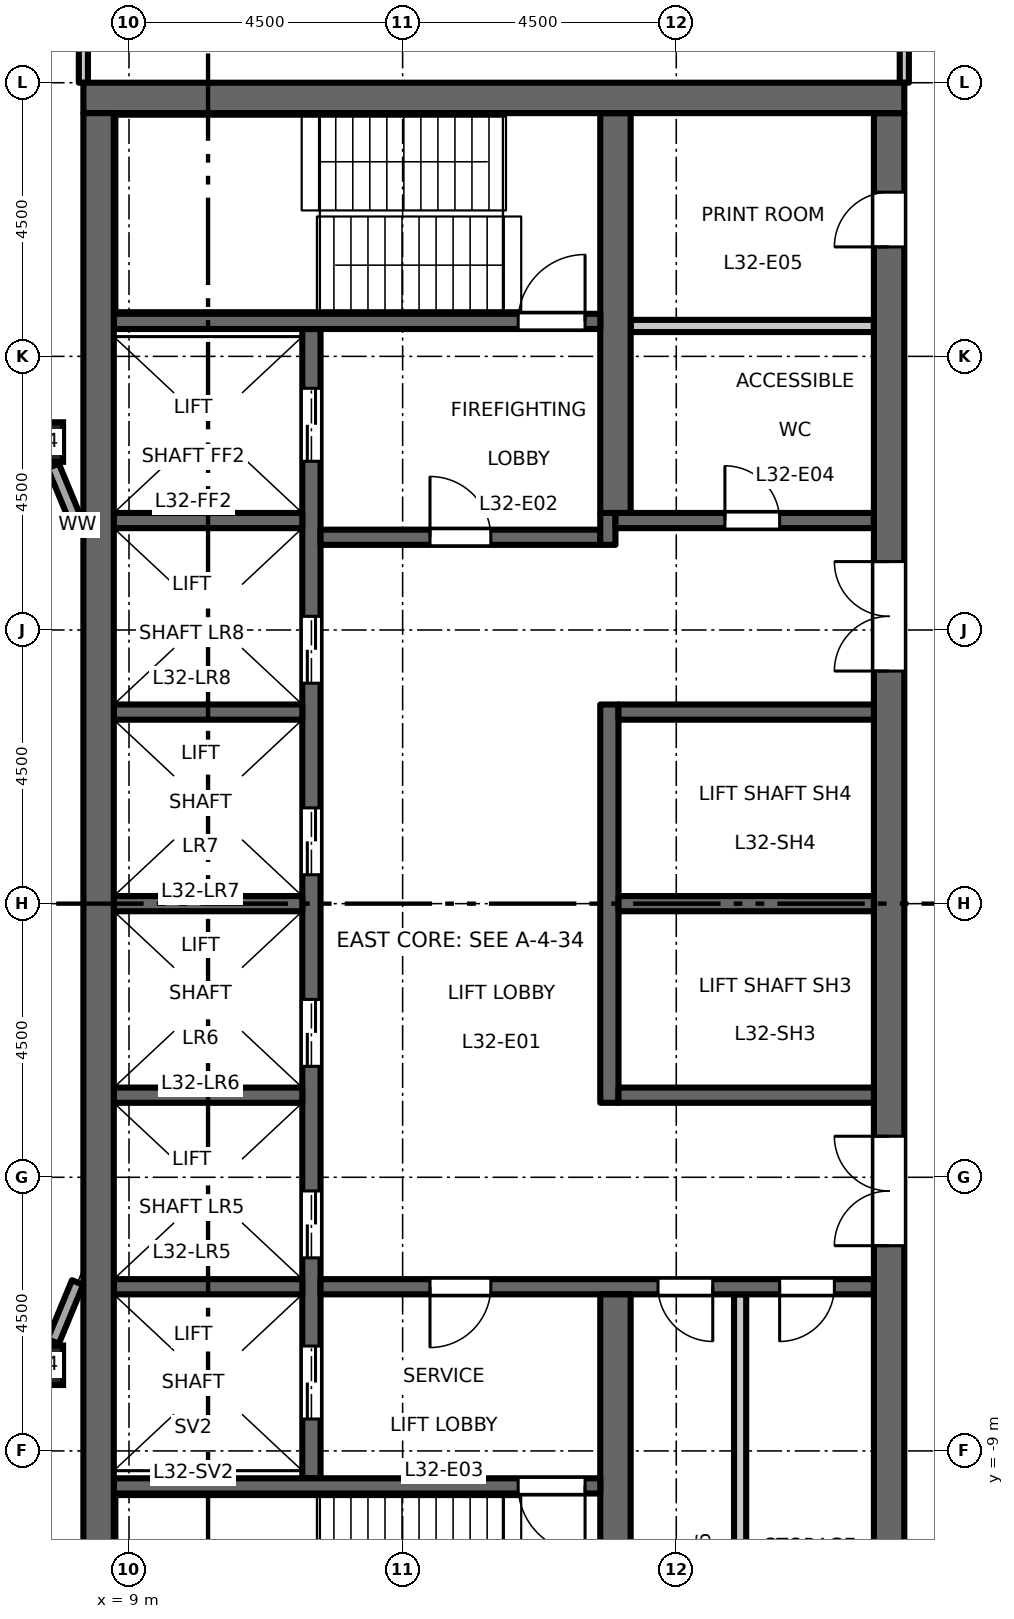
"""IFC4 building model, lengths in metres.
Left out: names, types, materials, properties, quantities, classifications, styles, units other than length and angle.
Written with IfcOpenShell. Run it as: python <this file> out.ifc"""

import sys

from ifc_helpers import new_model, si_unit, direction, frame, frame_2d, origin, origin_2d, place, context, subcontext, project, spatial, rectangle, hollow_rectangle, extrude, element, fill, save


model = new_model("IFC4")
c1 = context("Model", 3, precision=1e-05, world=origin(), true_north=direction((0.0, 1.0)))
c2 = subcontext(c1, "Body", "Model", "MODEL_VIEW")
j1 = project(units=[si_unit("LENGTHUNIT", "METRE"), si_unit("PLANEANGLEUNIT", "RADIAN")], contexts=[c1])
p1 = place(None, origin())
s1 = spatial("IfcSite", under=j1, at=p1, CompositionType="ELEMENT")
p2 = place(p1, origin())
s2 = spatial("IfcBuilding", under=s1, at=p2, CompositionType="ELEMENT")
p3 = place(p2, frame((0.0, 0.0, 149.7)))
s3 = spatial("IfcBuildingStorey", under=s2, at=p3, CompositionType="ELEMENT", Elevation=149.7)
for number, where, z_axis, x_axis in (
    (1, (7.591, -7.591, 0.0), (0.0, 0.0, 1.0), (1.0, 0.0, 0.0)),
    (2, (7.591, 7.591, 0.0), (0.0, 0.0, 1.0), (1.0, 0.0, 0.0)),
):
    element("IfcColumn", number, at=place(p3, frame(where, z_axis=z_axis, x_axis=x_axis)), inside=s3, PredefinedType="COLUMN", context=c2, shape_type="SweptSolid", body=[
        extrude(hollow_rectangle(XDim=0.65, YDim=0.65, WallThickness=0.036, at=origin_2d()), origin(), (0.0, 0.0, 1.0), 4.5),
    ])
p4 = place(p3, frame((12.0, -9.45, 0.0), z_axis=(0.0, 0.0, 1.0), x_axis=(0.0, 1.0, 0.0)))
e3 = element("IfcWall", 3, at=p4, inside=s3, PredefinedType="SHEAR", context=c2, shape_type="SweptSolid", body=[
    extrude(rectangle(XDim=18.9, YDim=0.3, at=frame_2d((9.45, 0.0))), origin(), (0.0, 0.0, 1.0), 4.35),
])
p5 = place(p4, frame((3.625, 0.0, 0.0)))
e4 = element("IfcOpeningElement", 4, at=p5, cuts=e3, PredefinedType="OPENING", context=c2, shape_type="SweptSolid", body=[
    extrude(rectangle(XDim=1.1, YDim=2.1, at=frame_2d((0.55, 1.05))), frame((0.0, 0.16, 0.0), z_axis=(0.0, -1.0, 0.0), x_axis=(1.0, 0.0, 0.0)), (0.0, 0.0, 1.0), 0.32),
])
p6 = place(p4, frame((6.775, 0.0, 0.0)))
e5 = element("IfcOpeningElement", 5, at=p6, cuts=e3, PredefinedType="OPENING", context=c2, shape_type="SweptSolid", body=[
    extrude(rectangle(XDim=1.1, YDim=2.1, at=frame_2d((0.55, 1.05))), frame((0.0, 0.16, 0.0), z_axis=(0.0, -1.0, 0.0), x_axis=(1.0, 0.0, 0.0)), (0.0, 0.0, 1.0), 0.32),
])
p7 = place(p4, frame((9.925, 0.0, 0.0)))
e6 = element("IfcOpeningElement", 6, at=p7, cuts=e3, PredefinedType="OPENING", context=c2, shape_type="SweptSolid", body=[
    extrude(rectangle(XDim=1.1, YDim=2.1, at=frame_2d((0.55, 1.05))), frame((0.0, 0.16, 0.0), z_axis=(0.0, -1.0, 0.0), x_axis=(1.0, 0.0, 0.0)), (0.0, 0.0, 1.0), 0.32),
])
p8 = place(p4, frame((13.075, 0.0, 0.0)))
e7 = element("IfcOpeningElement", 7, at=p8, cuts=e3, PredefinedType="OPENING", context=c2, shape_type="SweptSolid", body=[
    extrude(rectangle(XDim=1.1, YDim=2.1, at=frame_2d((0.55, 1.05))), frame((0.0, 0.16, 0.0), z_axis=(0.0, -1.0, 0.0), x_axis=(1.0, 0.0, 0.0)), (0.0, 0.0, 1.0), 0.32),
])
p9 = place(p4, frame((16.725, 0.0, 0.0)))
e8 = element("IfcOpeningElement", 8, at=p9, cuts=e3, PredefinedType="OPENING", context=c2, shape_type="SweptSolid", body=[
    extrude(rectangle(XDim=1.2, YDim=2.1, at=frame_2d((0.6, 1.05))), frame((0.0, 0.16, 0.0), z_axis=(0.0, -1.0, 0.0), x_axis=(1.0, 0.0, 0.0)), (0.0, 0.0, 1.0), 0.32),
])
p10 = place(p4, frame((0.975, 0.0, 0.0)))
e9 = element("IfcOpeningElement", 9, at=p10, cuts=e3, PredefinedType="OPENING", context=c2, shape_type="SweptSolid", body=[
    extrude(rectangle(XDim=1.2, YDim=2.1, at=frame_2d((0.6, 1.05))), frame((0.0, 0.16, 0.0), z_axis=(0.0, -1.0, 0.0), x_axis=(1.0, 0.0, 0.0)), (0.0, 0.0, 1.0), 0.32),
])
p11 = place(p3, frame((12.15, 6.025, 0.0), z_axis=(0.0, 0.0, 1.0), x_axis=(1.0, 0.0, 0.0)))
e10 = element("IfcWall", 10, at=p11, inside=s3, PredefinedType="SHEAR", context=c2, shape_type="SweptSolid", body=[
    extrude(rectangle(XDim=4.6, YDim=0.25, at=frame_2d((2.3, 0.0))), origin(), (0.0, 0.0, 1.0), 4.35),
])
p12 = place(p11, frame((1.8, 0.0, 0.0)))
e11 = element("IfcOpeningElement", 11, at=p12, cuts=e10, PredefinedType="OPENING", context=c2, shape_type="SweptSolid", body=[
    extrude(rectangle(XDim=1.0, YDim=2.1, at=frame_2d((0.5, 1.05))), frame((0.0, 0.135, 0.0), z_axis=(0.0, -1.0, 0.0), x_axis=(1.0, 0.0, 0.0)), (0.0, 0.0, 1.0), 0.27),
])
p13 = place(p3, frame((16.875, 5.9, 0.0), z_axis=(0.0, 0.0, 1.0), x_axis=(0.0, 1.0, 0.0)))
e12 = element("IfcWall", 12, at=p13, inside=s3, PredefinedType="SHEAR", context=c2, shape_type="SweptSolid", body=[
    extrude(rectangle(XDim=0.525, YDim=0.25, at=frame_2d((0.263, 0.0))), origin(), (0.0, 0.0, 1.0), 4.35),
])
p14 = place(p3, frame((17.0, 6.3, 0.0), z_axis=(0.0, 0.0, 1.0), x_axis=(1.0, 0.0, 0.0)))
e13 = element("IfcWall", 13, at=p14, inside=s3, PredefinedType="SHEAR", context=c2, shape_type="SweptSolid", body=[
    extrude(rectangle(XDim=4.25, YDim=0.25, at=frame_2d((2.125, 0.0))), origin(), (0.0, 0.0, 1.0), 4.35),
])
p15 = place(p14, frame((1.8, 0.0, 0.0)))
e14 = element("IfcOpeningElement", 14, at=p15, cuts=e13, PredefinedType="OPENING", context=c2, shape_type="SweptSolid", body=[
    extrude(rectangle(XDim=0.9, YDim=2.1, at=frame_2d((0.45, 1.05))), frame((0.0, 0.135, 0.0), z_axis=(0.0, -1.0, 0.0), x_axis=(1.0, 0.0, 0.0)), (0.0, 0.0, 1.0), 0.27),
])
p16 = place(p3, frame((12.15, -6.3, 0.0), z_axis=(0.0, 0.0, 1.0), x_axis=(1.0, 0.0, 0.0)))
e15 = element("IfcWall", 15, at=p16, inside=s3, PredefinedType="SHEAR", context=c2, shape_type="SweptSolid", body=[
    extrude(rectangle(XDim=9.1, YDim=0.25, at=frame_2d((4.55, 0.0))), origin(), (0.0, 0.0, 1.0), 4.35),
])
p17 = place(p16, frame((1.8, 0.0, 0.0)))
e16 = element("IfcOpeningElement", 16, at=p17, cuts=e15, PredefinedType="OPENING", context=c2, shape_type="SweptSolid", body=[
    extrude(rectangle(XDim=1.0, YDim=2.1, at=frame_2d((0.5, 1.05))), frame((0.0, 0.135, 0.0), z_axis=(0.0, -1.0, 0.0), x_axis=(1.0, 0.0, 0.0)), (0.0, 0.0, 1.0), 0.27),
])
p18 = place(p16, frame((5.55, 0.0, 0.0)))
e17 = element("IfcOpeningElement", 17, at=p18, cuts=e15, PredefinedType="OPENING", context=c2, shape_type="SweptSolid", body=[
    extrude(rectangle(XDim=0.9, YDim=2.1, at=frame_2d((0.45, 1.05))), frame((0.0, 0.135, 0.0), z_axis=(0.0, -1.0, 0.0), x_axis=(1.0, 0.0, 0.0)), (0.0, 0.0, 1.0), 0.27),
])
p19 = place(p16, frame((7.55, 0.0, 0.0)))
e18 = element("IfcOpeningElement", 18, at=p19, cuts=e15, PredefinedType="OPENING", context=c2, shape_type="SweptSolid", body=[
    extrude(rectangle(XDim=0.9, YDim=2.1, at=frame_2d((0.45, 1.05))), frame((0.0, 0.135, 0.0), z_axis=(0.0, -1.0, 0.0), x_axis=(1.0, 0.0, 0.0)), (0.0, 0.0, 1.0), 0.27),
])
p20 = place(p3, frame((21.5, -13.0, 0.0), z_axis=(0.0, 0.0, 1.0), x_axis=(0.0, 1.0, 0.0)))
e19 = element("IfcWall", 19, at=p20, inside=s3, PredefinedType="SHEAR", context=c2, shape_type="SweptSolid", body=[
    extrude(rectangle(XDim=26.0, YDim=0.5, at=frame_2d((13.0, 0.0))), origin(), (0.0, 0.0, 1.0), 4.35),
])
p21 = place(p20, frame((16.825, 0.0, 0.0)))
e20 = element("IfcOpeningElement", 20, at=p21, cuts=e19, PredefinedType="OPENING", context=c2, shape_type="SweptSolid", body=[
    extrude(rectangle(XDim=1.8, YDim=2.1, at=frame_2d((0.9, 1.05))), frame((0.0, 0.26, 0.0), z_axis=(0.0, -1.0, 0.0), x_axis=(1.0, 0.0, 0.0)), (0.0, 0.0, 1.0), 0.52),
])
p22 = place(p20, frame((7.375, 0.0, 0.0)))
e21 = element("IfcOpeningElement", 21, at=p22, cuts=e19, PredefinedType="OPENING", context=c2, shape_type="SweptSolid", body=[
    extrude(rectangle(XDim=1.8, YDim=2.1, at=frame_2d((0.9, 1.05))), frame((0.0, 0.26, 0.0), z_axis=(0.0, -1.0, 0.0), x_axis=(1.0, 0.0, 0.0)), (0.0, 0.0, 1.0), 0.52),
])
p23 = place(p20, frame((23.8, 0.0, 0.0)))
e22 = element("IfcOpeningElement", 22, at=p23, cuts=e19, PredefinedType="OPENING", context=c2, shape_type="SweptSolid", body=[
    extrude(rectangle(XDim=0.9, YDim=2.1, at=frame_2d((0.45, 1.05))), frame((0.0, 0.26, 0.0), z_axis=(0.0, -1.0, 0.0), x_axis=(1.0, 0.0, 0.0)), (0.0, 0.0, 1.0), 0.52),
])
p24 = place(p3, frame((17.25, 9.5, 0.0), z_axis=(0.0, 0.0, 1.0), x_axis=(1.0, 0.0, 0.0)))
e23 = element("IfcWall", 23, at=p24, inside=s3, PredefinedType="PARTITIONING", context=c2, shape_type="SweptSolid", body=[
    extrude(rectangle(XDim=4.0, YDim=0.2, at=frame_2d((2.0, 0.0))), origin(), (0.0, 0.0, 1.0), 4.35),
])
p25 = place(p3, frame((19.05, -13.0, 0.0), z_axis=(0.0, 0.0, 1.0), x_axis=(0.0, 1.0, 0.0)))
e24 = element("IfcWall", 24, at=p25, inside=s3, PredefinedType="PARTITIONING", context=c2, shape_type="SweptSolid", body=[
    extrude(rectangle(XDim=6.575, YDim=0.2, at=frame_2d((3.288, 0.0))), origin(), (0.0, 0.0, 1.0), 4.35),
])
p26 = place(p3, frame((16.9, -3.275, 0.0), z_axis=(0.0, 0.0, 1.0), x_axis=(0.0, 1.0, 0.0)))
e25 = element("IfcWall", 25, at=p26, inside=s3, PredefinedType="SHEAR", context=c2, shape_type="SweptSolid", body=[
    extrude(rectangle(XDim=6.55, YDim=0.3, at=frame_2d((3.275, 0.0))), origin(), (0.0, 0.0, 1.0), 4.35),
])
for number, where, z_axis, x_axis in (
    (26, (17.05, 0.0, 0.0), (0.0, 0.0, 1.0), (1.0, 0.0, 0.0)),
    (27, (17.05, 3.15, 0.0), (0.0, 0.0, 1.0), (1.0, 0.0, 0.0)),
    (28, (17.05, -3.15, 0.0), (0.0, 0.0, 1.0), (1.0, 0.0, 0.0)),
):
    element("IfcWall", number, at=place(p3, frame(where, z_axis=z_axis, x_axis=x_axis)), inside=s3, PredefinedType="SHEAR", context=c2, shape_type="SweptSolid", body=[
        extrude(rectangle(XDim=4.2, YDim=0.25, at=frame_2d((2.1, 0.0))), origin(), (0.0, 0.0, 1.0), 4.35),
    ])
for number, where, z_axis, x_axis in (
    (29, (17.0, 6.425, 0.0), (0.0, 0.0, 1.0), (0.0, 1.0, 0.0)),
    (30, (17.0, -13.0, 0.0), (0.0, 0.0, 1.0), (0.0, 1.0, 0.0)),
):
    element("IfcWall", number, at=place(p3, frame(where, z_axis=z_axis, x_axis=x_axis)), inside=s3, PredefinedType="SHEAR", context=c2, shape_type="SweptSolid", body=[
        extrude(rectangle(XDim=6.575, YDim=0.5, at=frame_2d((3.288, 0.0))), origin(), (0.0, 0.0, 1.0), 4.35),
    ])
for number, where, z_axis, x_axis in (
    (31, (8.75, 0.0, 0.0), (0.0, 0.0, 1.0), (1.0, 0.0, 0.0)),
    (32, (8.75, 3.15, 0.0), (0.0, 0.0, 1.0), (1.0, 0.0, 0.0)),
    (33, (8.75, 6.3, 0.0), (0.0, 0.0, 1.0), (1.0, 0.0, 0.0)),
    (34, (8.75, -3.15, 0.0), (0.0, 0.0, 1.0), (1.0, 0.0, 0.0)),
    (35, (8.75, -6.3, 0.0), (0.0, 0.0, 1.0), (1.0, 0.0, 0.0)),
):
    element("IfcWall", number, at=place(p3, frame(where, z_axis=z_axis, x_axis=x_axis)), inside=s3, PredefinedType="SHEAR", context=c2, shape_type="SweptSolid", body=[
        extrude(rectangle(XDim=3.1, YDim=0.25, at=frame_2d((1.55, 0.0))), origin(), (0.0, 0.0, 1.0), 4.35),
    ])
p27 = place(p3, frame((8.75, 9.575, 0.0), z_axis=(0.0, 0.0, 1.0), x_axis=(1.0, 0.0, 0.0)))
e36 = element("IfcWall", 36, at=p27, inside=s3, PredefinedType="SHEAR", context=c2, shape_type="SweptSolid", body=[
    extrude(rectangle(XDim=8.0, YDim=0.25, at=frame_2d((4.0, 0.0))), origin(), (0.0, 0.0, 1.0), 4.35),
])
p28 = place(p27, frame((6.65, 0.0, 0.0)))
e37 = element("IfcOpeningElement", 37, at=p28, cuts=e36, PredefinedType="OPENING", context=c2, shape_type="SweptSolid", body=[
    extrude(rectangle(XDim=1.1, YDim=2.1, at=frame_2d((0.55, 1.05))), frame((0.0, 0.135, 0.0), z_axis=(0.0, -1.0, 0.0), x_axis=(1.0, 0.0, 0.0)), (0.0, 0.0, 1.0), 0.27),
])
p29 = place(p3, frame((8.75, -9.575, 0.0), z_axis=(0.0, 0.0, 1.0), x_axis=(1.0, 0.0, 0.0)))
e38 = element("IfcWall", 38, at=p29, inside=s3, PredefinedType="SHEAR", context=c2, shape_type="SweptSolid", body=[
    extrude(rectangle(XDim=8.0, YDim=0.25, at=frame_2d((4.0, 0.0))), origin(), (0.0, 0.0, 1.0), 4.35),
])
p30 = place(p29, frame((6.65, 0.0, 0.0)))
e39 = element("IfcOpeningElement", 39, at=p30, cuts=e38, PredefinedType="OPENING", context=c2, shape_type="SweptSolid", body=[
    extrude(rectangle(XDim=1.1, YDim=2.1, at=frame_2d((0.55, 1.05))), frame((0.0, 0.135, 0.0), z_axis=(0.0, -1.0, 0.0), x_axis=(1.0, 0.0, 0.0)), (0.0, 0.0, 1.0), 0.27),
])
p31 = place(p3, frame((8.25, 13.25, 0.0), z_axis=(0.0, 0.0, 1.0), x_axis=(1.0, 0.0, 0.0)))
e40 = element("IfcWall", 40, at=p31, inside=s3, PredefinedType="SHEAR", context=c2, shape_type="SweptSolid", body=[
    extrude(rectangle(XDim=13.5, YDim=0.5, at=frame_2d((6.75, 0.0))), origin(), (0.0, 0.0, 1.0), 4.35),
])
p32 = place(p3, frame((8.5, -13.0, 0.0), z_axis=(0.0, 0.0, 1.0), x_axis=(0.0, 1.0, 0.0)))
e41 = element("IfcWall", 41, at=p32, inside=s3, PredefinedType="SHEAR", context=c2, shape_type="SweptSolid", body=[
    extrude(rectangle(XDim=26.0, YDim=0.5, at=frame_2d((13.0, 0.0))), origin(), (0.0, 0.0, 1.0), 4.35),
])
for number, where, z_axis, x_axis in (
    (42, (7.753, -7.199, 0.0), (0.0, 0.0, 1.0), (0.383, 0.924, 0.0)),
    (43, (8.154, 6.231, 0.0), (0.0, 0.0, 1.0), (-0.383, 0.924, 0.0)),
):
    element("IfcWall", number, at=place(p3, frame(where, z_axis=z_axis, x_axis=x_axis)), inside=s3, PredefinedType="STANDARD", context=c2, shape_type="SweptSolid", body=[
        extrude(rectangle(XDim=1.048, YDim=0.2, at=frame_2d((0.524, 0.0))), origin(), (0.0, 0.0, 1.0), 3.826),
    ])
p33 = place(p3, frame((8.25, 13.5, 0.0), z_axis=(0.0, 0.0, 1.0), x_axis=(0.0, 1.0, 0.0)))
e44 = element("IfcWall", 44, at=p33, inside=s3, PredefinedType="PARTITIONING", context=c2, shape_type="SweptSolid", body=[
    extrude(rectangle(XDim=1.3, YDim=0.15, at=frame_2d((0.65, 0.0))), origin(), (0.0, 0.0, 1.0), 4.35),
])
p34 = place(p3, frame((21.75, 13.5, 0.0), z_axis=(0.0, 0.0, 1.0), x_axis=(0.0, 1.0, 0.0)))
e45 = element("IfcWall", 45, at=p34, inside=s3, PredefinedType="PARTITIONING", context=c2, shape_type="SweptSolid", body=[
    extrude(rectangle(XDim=3.425, YDim=0.15, at=frame_2d((1.712, 0.0))), origin(), (0.0, 0.0, 1.0), 4.35),
])
p35 = place(p12, origin())
e46 = element("IfcDoor", 46, at=p35, inside=s3, OperationType="SINGLE_SWING_RIGHT", PredefinedType="DOOR", context=c2, shape_type="SweptSolid", body=[
    extrude(rectangle(XDim=1.0, YDim=2.1, at=frame_2d((0.5, 1.05))), frame((0.0, 0.025, 0.0), z_axis=(0.0, -1.0, 0.0), x_axis=(1.0, 0.0, 0.0)), (0.0, 0.0, 1.0), 0.05),
])
fill(e11, e46)
p36 = place(p17, origin())
e47 = element("IfcDoor", 47, at=p36, inside=s3, OperationType="SINGLE_SWING_LEFT", PredefinedType="DOOR", context=c2, shape_type="SweptSolid", body=[
    extrude(rectangle(XDim=1.0, YDim=2.1, at=frame_2d((0.5, 1.05))), frame((0.0, 0.025, 0.0), z_axis=(0.0, -1.0, 0.0), x_axis=(1.0, 0.0, 0.0)), (0.0, 0.0, 1.0), 0.05),
])
fill(e16, e47)
p37 = place(p28, origin())
e48 = element("IfcDoor", 48, at=p37, inside=s3, OperationType="SINGLE_SWING_LEFT", PredefinedType="DOOR", context=c2, shape_type="SweptSolid", body=[
    extrude(rectangle(XDim=1.1, YDim=2.1, at=frame_2d((0.55, 1.05))), frame((0.0, 0.025, 0.0), z_axis=(0.0, -1.0, 0.0), x_axis=(1.0, 0.0, 0.0)), (0.0, 0.0, 1.0), 0.05),
])
fill(e37, e48)
p38 = place(p30, origin())
e49 = element("IfcDoor", 49, at=p38, inside=s3, OperationType="SINGLE_SWING_RIGHT", PredefinedType="DOOR", context=c2, shape_type="SweptSolid", body=[
    extrude(rectangle(XDim=1.1, YDim=2.1, at=frame_2d((0.55, 1.05))), frame((0.0, 0.025, 0.0), z_axis=(0.0, -1.0, 0.0), x_axis=(1.0, 0.0, 0.0)), (0.0, 0.0, 1.0), 0.05),
])
fill(e39, e49)
p39 = place(p21, origin())
e50 = element("IfcDoor", 50, at=p39, inside=s3, OperationType="DOUBLE_DOOR_DOUBLE_SWING", PredefinedType="DOOR", context=c2, shape_type="SweptSolid", body=[
    extrude(rectangle(XDim=1.8, YDim=2.1, at=frame_2d((0.9, 1.05))), frame((0.0, 0.025, 0.0), z_axis=(0.0, -1.0, 0.0), x_axis=(1.0, 0.0, 0.0)), (0.0, 0.0, 1.0), 0.05),
])
fill(e20, e50)
p40 = place(p22, origin())
e51 = element("IfcDoor", 51, at=p40, inside=s3, OperationType="DOUBLE_DOOR_DOUBLE_SWING", PredefinedType="DOOR", context=c2, shape_type="SweptSolid", body=[
    extrude(rectangle(XDim=1.8, YDim=2.1, at=frame_2d((0.9, 1.05))), frame((0.0, 0.025, 0.0), z_axis=(0.0, -1.0, 0.0), x_axis=(1.0, 0.0, 0.0)), (0.0, 0.0, 1.0), 0.05),
])
fill(e21, e51)
p41 = place(p5, origin())
e52 = element("IfcDoor", 52, at=p41, inside=s3, OperationType="DOUBLE_DOOR_SLIDING", PredefinedType="DOOR", context=c2, shape_type="SweptSolid", body=[
    extrude(rectangle(XDim=1.1, YDim=2.1, at=frame_2d((0.55, 1.05))), frame((0.0, 0.025, 0.0), z_axis=(0.0, -1.0, 0.0), x_axis=(1.0, 0.0, 0.0)), (0.0, 0.0, 1.0), 0.05),
])
fill(e4, e52)
p42 = place(p6, origin())
e53 = element("IfcDoor", 53, at=p42, inside=s3, OperationType="DOUBLE_DOOR_SLIDING", PredefinedType="DOOR", context=c2, shape_type="SweptSolid", body=[
    extrude(rectangle(XDim=1.1, YDim=2.1, at=frame_2d((0.55, 1.05))), frame((0.0, 0.025, 0.0), z_axis=(0.0, -1.0, 0.0), x_axis=(1.0, 0.0, 0.0)), (0.0, 0.0, 1.0), 0.05),
])
fill(e5, e53)
p43 = place(p7, origin())
e54 = element("IfcDoor", 54, at=p43, inside=s3, OperationType="DOUBLE_DOOR_SLIDING", PredefinedType="DOOR", context=c2, shape_type="SweptSolid", body=[
    extrude(rectangle(XDim=1.1, YDim=2.1, at=frame_2d((0.55, 1.05))), frame((0.0, 0.025, 0.0), z_axis=(0.0, -1.0, 0.0), x_axis=(1.0, 0.0, 0.0)), (0.0, 0.0, 1.0), 0.05),
])
fill(e6, e54)
p44 = place(p8, origin())
e55 = element("IfcDoor", 55, at=p44, inside=s3, OperationType="DOUBLE_DOOR_SLIDING", PredefinedType="DOOR", context=c2, shape_type="SweptSolid", body=[
    extrude(rectangle(XDim=1.1, YDim=2.1, at=frame_2d((0.55, 1.05))), frame((0.0, 0.025, 0.0), z_axis=(0.0, -1.0, 0.0), x_axis=(1.0, 0.0, 0.0)), (0.0, 0.0, 1.0), 0.05),
])
fill(e7, e55)
p45 = place(p9, origin())
e56 = element("IfcDoor", 56, at=p45, inside=s3, OperationType="DOUBLE_DOOR_SLIDING", PredefinedType="DOOR", context=c2, shape_type="SweptSolid", body=[
    extrude(rectangle(XDim=1.2, YDim=2.1, at=frame_2d((0.6, 1.05))), frame((0.0, 0.025, 0.0), z_axis=(0.0, -1.0, 0.0), x_axis=(1.0, 0.0, 0.0)), (0.0, 0.0, 1.0), 0.05),
])
fill(e8, e56)
p46 = place(p10, origin())
e57 = element("IfcDoor", 57, at=p46, inside=s3, OperationType="DOUBLE_DOOR_SLIDING", PredefinedType="DOOR", context=c2, shape_type="SweptSolid", body=[
    extrude(rectangle(XDim=1.2, YDim=2.1, at=frame_2d((0.6, 1.05))), frame((0.0, 0.025, 0.0), z_axis=(0.0, -1.0, 0.0), x_axis=(1.0, 0.0, 0.0)), (0.0, 0.0, 1.0), 0.05),
])
fill(e9, e57)
p47 = place(p15, origin())
e58 = element("IfcDoor", 58, at=p47, inside=s3, OperationType="SINGLE_SWING_RIGHT", PredefinedType="DOOR", context=c2, shape_type="SweptSolid", body=[
    extrude(rectangle(XDim=0.9, YDim=2.1, at=frame_2d((0.45, 1.05))), frame((0.0, 0.025, 0.0), z_axis=(0.0, -1.0, 0.0), x_axis=(1.0, 0.0, 0.0)), (0.0, 0.0, 1.0), 0.05),
])
fill(e14, e58)
p48 = place(p23, origin())
e59 = element("IfcDoor", 59, at=p48, inside=s3, OperationType="SINGLE_SWING_RIGHT", PredefinedType="DOOR", context=c2, shape_type="SweptSolid", body=[
    extrude(rectangle(XDim=0.9, YDim=2.1, at=frame_2d((0.45, 1.05))), frame((0.0, 0.025, 0.0), z_axis=(0.0, -1.0, 0.0), x_axis=(1.0, 0.0, 0.0)), (0.0, 0.0, 1.0), 0.05),
])
fill(e22, e59)
p49 = place(p18, origin())
e60 = element("IfcDoor", 60, at=p49, inside=s3, OperationType="SINGLE_SWING_RIGHT", PredefinedType="DOOR", context=c2, shape_type="SweptSolid", body=[
    extrude(rectangle(XDim=0.9, YDim=2.1, at=frame_2d((0.45, 1.05))), frame((0.0, 0.025, 0.0), z_axis=(0.0, -1.0, 0.0), x_axis=(1.0, 0.0, 0.0)), (0.0, 0.0, 1.0), 0.05),
])
fill(e17, e60)
p50 = place(p19, origin())
e61 = element("IfcDoor", 61, at=p50, inside=s3, OperationType="SINGLE_SWING_LEFT", PredefinedType="DOOR", context=c2, shape_type="SweptSolid", body=[
    extrude(rectangle(XDim=0.9, YDim=2.1, at=frame_2d((0.45, 1.05))), frame((0.0, 0.025, 0.0), z_axis=(0.0, -1.0, 0.0), x_axis=(1.0, 0.0, 0.0)), (0.0, 0.0, 1.0), 0.05),
])
fill(e18, e61)
save(model, sys.argv[1])
